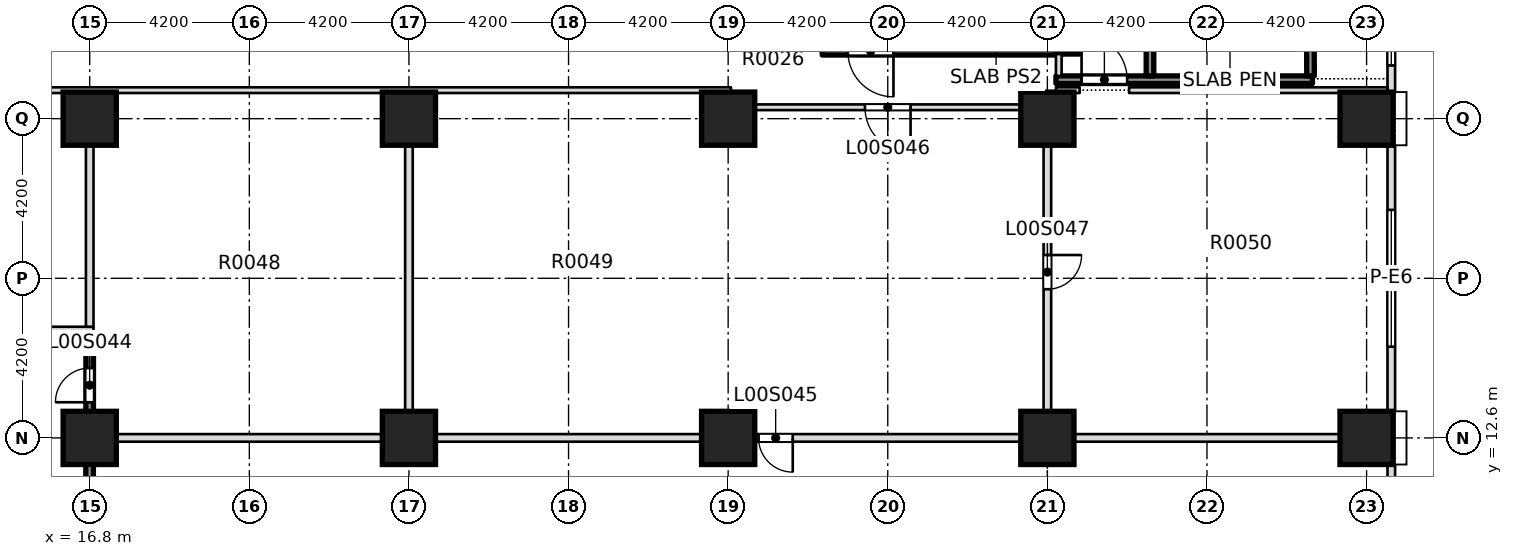
"""IFC4 building model, lengths in metres.
Left out: names, types, materials, properties, quantities, classifications, styles, units other than length and angle.
Written with IfcOpenShell. Run it as: python <this file> out.ifc"""

import sys

from ifc_helpers import new_model, si_unit, direction, frame, frame_2d, origin, origin_2d, place, context, subcontext, project, spatial, rectangle, extrude, element, fill, save


model = new_model("IFC4")
c1 = context("Model", 3, precision=1e-05, world=origin(), true_north=direction((0.0, 1.0)))
c2 = subcontext(c1, "Body", "Model", "MODEL_VIEW")
j1 = project(units=[si_unit("LENGTHUNIT", "METRE"), si_unit("PLANEANGLEUNIT", "RADIAN")], contexts=[c1])
p1 = place(None, origin())
s1 = spatial("IfcSite", under=j1, at=p1, CompositionType="ELEMENT")
p2 = place(p1, origin())
s2 = spatial("IfcBuilding", under=s1, at=p2, CompositionType="ELEMENT")
p3 = place(p2, origin())
s3 = spatial("IfcBuildingStorey", under=s2, at=p3, CompositionType="ELEMENT", Elevation=0.0)
for number, where, z_axis, x_axis in (
    (1, (16.8, 12.6, -0.45), (0.0, 0.0, 1.0), (1.0, 0.0, 0.0)),
    (2, (25.2, 12.6, -0.45), (0.0, 0.0, 1.0), (1.0, 0.0, 0.0)),
    (3, (16.8, 21.0, -0.45), (0.0, 0.0, 1.0), (1.0, 0.0, 0.0)),
):
    element("IfcColumn", number, at=place(p3, frame(where, z_axis=z_axis, x_axis=x_axis)), inside=s3, PredefinedType="COLUMN", context=c2, shape_type="SweptSolid", body=[
        extrude(rectangle(XDim=1.4, YDim=1.4, at=origin_2d()), origin(), (0.0, 0.0, 1.0), 7.55),
    ])
for number, where, z_axis, x_axis in (
    (4, (33.6, 12.6, 0.0), (0.0, 0.0, 1.0), (1.0, 0.0, 0.0)),
    (5, (42.0, 12.6, 0.0), (0.0, 0.0, 1.0), (1.0, 0.0, 0.0)),
    (6, (50.4, 12.6, 0.0), (0.0, 0.0, 1.0), (1.0, 0.0, 0.0)),
    (7, (25.2, 21.0, 0.0), (0.0, 0.0, 1.0), (1.0, 0.0, 0.0)),
    (8, (33.6, 21.0, 0.0), (0.0, 0.0, 1.0), (1.0, 0.0, 0.0)),
    (9, (42.0, 21.0, 0.0), (0.0, 0.0, 1.0), (1.0, 0.0, 0.0)),
    (10, (50.4, 21.0, 0.0), (0.0, 0.0, 1.0), (1.0, 0.0, 0.0)),
):
    element("IfcColumn", number, at=place(p3, frame(where, z_axis=z_axis, x_axis=x_axis)), inside=s3, PredefinedType="COLUMN", context=c2, shape_type="SweptSolid", body=[
        extrude(rectangle(XDim=1.4, YDim=1.4, at=origin_2d()), origin(), (0.0, 0.0, 1.0), 7.5),
    ])
p4 = place(p3, frame((16.875, 12.6, 0.0), z_axis=(0.0, 0.0, 1.0), x_axis=(1.0, 0.0, 0.0)))
e11 = element("IfcWall", 11, at=p4, inside=s3, PredefinedType="PARTITIONING", context=c2, shape_type="SweptSolid", body=[
    extrude(rectangle(XDim=34.075, YDim=0.2, at=frame_2d((17.038, 0.0))), origin(), (0.0, 0.0, 1.0), 7.1),
])
p5 = place(p4, frame((17.525, 0.0, 0.0)))
e12 = element("IfcOpeningElement", 12, at=p5, cuts=e11, PredefinedType="OPENING", context=c2, shape_type="SweptSolid", body=[
    extrude(rectangle(XDim=0.9, YDim=2.1, at=frame_2d((0.45, 1.05))), frame((0.0, 0.11, 0.0), z_axis=(0.0, -1.0, 0.0), x_axis=(1.0, 0.0, 0.0)), (0.0, 0.0, 1.0), 0.22),
])
p6 = place(p3, frame((12.601, 15.45, 0.0), z_axis=(0.0, 0.0, 1.0), x_axis=(1.0, 0.0, 0.0)))
e13 = element("IfcWall", 13, at=p6, inside=s3, PredefinedType="PARTITIONING", context=c2, shape_type="SweptSolid", body=[
    extrude(rectangle(XDim=4.299, YDim=0.15, at=frame_2d((2.149, 0.0))), origin(), (0.0, 0.0, 1.0), 7.1),
])
p7 = place(p6, frame((1.549, 0.0, 0.0)))
e14 = element("IfcOpeningElement", 14, at=p7, cuts=e13, PredefinedType="OPENING", context=c2, shape_type="SweptSolid", body=[
    extrude(rectangle(XDim=1.1, YDim=2.1, at=frame_2d((0.55, 1.05))), frame((0.0, 0.085, 0.0), z_axis=(0.0, -1.0, 0.0), x_axis=(1.0, 0.0, 0.0)), (0.0, 0.0, 1.0), 0.17),
])
p8 = place(p3, frame((33.525, 21.3, 0.0), z_axis=(0.0, 0.0, 1.0), x_axis=(1.0, 0.0, 0.0)))
e15 = element("IfcWall", 15, at=p8, inside=s3, PredefinedType="PARTITIONING", context=c2, shape_type="SweptSolid", body=[
    extrude(rectangle(XDim=8.85, YDim=0.15, at=frame_2d((4.425, 0.0))), origin(), (0.0, 0.0, 1.0), 7.1),
])
p9 = place(p8, frame((3.675, 0.0, 0.0)))
e16 = element("IfcOpeningElement", 16, at=p9, cuts=e15, PredefinedType="OPENING", context=c2, shape_type="SweptSolid", body=[
    extrude(rectangle(XDim=1.2, YDim=2.1, at=frame_2d((0.6, 1.05))), frame((0.0, 0.085, 0.0), z_axis=(0.0, -1.0, 0.0), x_axis=(1.0, 0.0, 0.0)), (0.0, 0.0, 1.0), 0.17),
])
p10 = place(p3, frame((12.601, 21.75, 0.0), z_axis=(0.0, 0.0, 1.0), x_axis=(1.0, 0.0, 0.0)))
e17 = element("IfcWall", 17, at=p10, inside=s3, PredefinedType="PARTITIONING", context=c2, shape_type="SweptSolid", body=[
    extrude(rectangle(XDim=21.074, YDim=0.15, at=frame_2d((10.537, 0.0))), origin(), (0.0, 0.0, 1.0), 7.1),
])
p11 = place(p3, frame((42.225, 21.75, 0.0), z_axis=(0.0, 0.0, 1.0), x_axis=(1.0, 0.0, 0.0)))
e18 = element("IfcWall", 18, at=p11, inside=s3, PredefinedType="PARTITIONING", context=c2, shape_type="SweptSolid", body=[
    extrude(rectangle(XDim=0.625, YDim=0.15, at=frame_2d((0.312, 0.0))), origin(), (0.0, 0.0, 1.0), 7.1),
])
p12 = place(p3, frame((42.225, 22.025, 0.0), z_axis=(0.0, 0.0, 1.0), x_axis=(1.0, 0.0, 0.0)))
e19 = element("IfcWall", 19, at=p12, inside=s3, PredefinedType="SOLIDWALL", context=c2, shape_type="SweptSolid", body=[
    extrude(rectangle(XDim=6.75, YDim=0.2, at=frame_2d((3.375, 0.0))), origin(), (0.0, 0.0, 1.0), 7.1),
])
p13 = place(p12, frame((0.675, 0.0, 0.0)))
e20 = element("IfcOpeningElement", 20, at=p13, cuts=e19, PredefinedType="OPENING", context=c2, shape_type="SweptSolid", body=[
    extrude(rectangle(XDim=1.2, YDim=2.1, at=frame_2d((0.6, 1.05))), frame((0.0, 0.11, 0.0), z_axis=(0.0, -1.0, 0.0), x_axis=(1.0, 0.0, 0.0)), (0.0, 0.0, 1.0), 0.22),
])
p14 = place(p3, frame((36.075, 22.775, 0.0), z_axis=(0.0, 0.0, 1.0), x_axis=(1.0, 0.0, 0.0)))
e21 = element("IfcWall", 21, at=p14, inside=s3, PredefinedType="SOLIDWALL", context=c2, shape_type="SweptSolid", body=[
    extrude(rectangle(XDim=6.3, YDim=0.2, at=frame_2d((3.15, 0.0))), origin(), (0.0, 0.0, 1.0), 7.1),
])
p15 = place(p14, frame((0.675, 0.0, 0.0)))
e22 = element("IfcOpeningElement", 22, at=p15, cuts=e21, PredefinedType="OPENING", context=c2, shape_type="SweptSolid", body=[
    extrude(rectangle(XDim=1.2, YDim=2.1, at=frame_2d((0.6, 1.05))), frame((0.0, 0.11, 0.0), z_axis=(0.0, -1.0, 0.0), x_axis=(1.0, 0.0, 0.0)), (0.0, 0.0, 1.0), 0.22),
])
p16 = place(p3, frame((42.225, 22.8, 0.0), z_axis=(0.0, 0.0, 1.0), x_axis=(1.0, 0.0, 0.0)))
e23 = element("IfcWall", 23, at=p16, inside=s3, PredefinedType="SOLIDWALL", context=c2, shape_type="SweptSolid", body=[
    extrude(rectangle(XDim=0.625, YDim=0.2, at=frame_2d((0.312, 0.0))), origin(), (0.0, 0.0, 1.0), 7.1),
])
p17 = place(p3, frame((16.775, -12.525, 0.0), z_axis=(0.0, 0.0, 1.0), x_axis=(0.000893357267, 0.999999600956, 0.0)))
e24 = element("IfcWall", 24, at=p17, inside=s3, PredefinedType="SOLIDWALL", context=c2, shape_type="SweptSolid", body=[
    extrude(rectangle(XDim=27.875, YDim=0.2, at=frame_2d((13.938, 0.0))), origin(), (0.0, 0.0, 1.0), 7.1),
])
p18 = place(p17, frame((16.225, 0.0, 0.0)))
e25 = element("IfcOpeningElement", 25, at=p18, cuts=e24, PredefinedType="OPENING", context=c2, shape_type="SweptSolid", body=[
    extrude(rectangle(XDim=1.5, YDim=2.1, at=frame_2d((0.75, 1.05))), frame((0.0, 0.11, 0.0), z_axis=(0.0, -1.0, 0.0), x_axis=(1.0, 0.0, 0.0)), (0.0, 0.0, 1.0), 0.22),
])
p19 = place(p17, frame((26.062, 0.0, 0.0)))
e26 = element("IfcOpeningElement", 26, at=p19, cuts=e24, PredefinedType="OPENING", context=c2, shape_type="SweptSolid", body=[
    extrude(rectangle(XDim=0.9, YDim=2.1, at=frame_2d((0.45, 1.05))), frame((0.0, 0.11, 0.0), z_axis=(0.0, -1.0, 0.0), x_axis=(1.0, 0.0, 0.0)), (0.0, 0.0, 1.0), 0.22),
])
p20 = place(p3, frame((16.8, 15.525, 0.0), z_axis=(0.0, 0.0, 1.0), x_axis=(0.0, 1.0, 0.0)))
e27 = element("IfcWall", 27, at=p20, inside=s3, PredefinedType="PARTITIONING", context=c2, shape_type="SweptSolid", body=[
    extrude(rectangle(XDim=6.15, YDim=0.2, at=frame_2d((3.075, 0.0))), origin(), (0.0, 0.0, 1.0), 7.1),
])
p21 = place(p3, frame((25.2, 12.7, 0.0), z_axis=(0.0, 0.0, 1.0), x_axis=(0.0, 1.0, 0.0)))
e28 = element("IfcWall", 28, at=p21, inside=s3, PredefinedType="PARTITIONING", context=c2, shape_type="SweptSolid", body=[
    extrude(rectangle(XDim=8.975, YDim=0.2, at=frame_2d((4.488, 0.0))), origin(), (0.0, 0.0, 1.0), 7.1),
])
p22 = place(p3, frame((33.6, 21.375, 0.0), z_axis=(0.0, 0.0, 1.0), x_axis=(0.0, 1.0, 0.0)))
e29 = element("IfcWall", 29, at=p22, inside=s3, PredefinedType="PARTITIONING", context=c2, shape_type="SweptSolid", body=[
    extrude(rectangle(XDim=0.3, YDim=0.15, at=frame_2d((0.15, 0.0))), origin(), (0.0, 0.0, 1.0), 7.1),
])
p23 = place(p3, frame((42.0, 12.7, 0.0), z_axis=(0.0, 0.0, 1.0), x_axis=(0.0, 1.0, 0.0)))
e30 = element("IfcWall", 30, at=p23, inside=s3, PredefinedType="PARTITIONING", context=c2, shape_type="SweptSolid", body=[
    extrude(rectangle(XDim=8.525, YDim=0.2, at=frame_2d((4.263, 0.0))), origin(), (0.0, 0.0, 1.0), 7.1),
])
p24 = place(p23, frame((3.812, 0.0, 0.0)))
e31 = element("IfcOpeningElement", 31, at=p24, cuts=e30, PredefinedType="OPENING", context=c2, shape_type="SweptSolid", body=[
    extrude(rectangle(XDim=0.9, YDim=2.1, at=frame_2d((0.45, 1.05))), frame((0.0, 0.11, 0.0), z_axis=(0.0, -1.0, 0.0), x_axis=(1.0, 0.0, 0.0)), (0.0, 0.0, 1.0), 0.22),
])
p25 = place(p3, frame((42.3, 21.375, 0.0), z_axis=(0.0, 0.0, 1.0), x_axis=(0.0, 1.0, 0.0)))
e32 = element("IfcWall", 32, at=p25, inside=s3, PredefinedType="PARTITIONING", context=c2, shape_type="SweptSolid", body=[
    extrude(rectangle(XDim=0.3, YDim=0.15, at=frame_2d((0.15, 0.0))), origin(), (0.0, 0.0, 1.0), 7.1),
])
p26 = place(p3, frame((42.3, 22.125, 0.0), z_axis=(0.0, 0.0, 1.0), x_axis=(0.0, 1.0, 0.0)))
e33 = element("IfcWall", 33, at=p26, inside=s3, PredefinedType="PARTITIONING", context=c2, shape_type="SweptSolid", body=[
    extrude(rectangle(XDim=0.575, YDim=0.15, at=frame_2d((0.288, 0.0))), origin(), (0.0, 0.0, 1.0), 7.1),
])
p27 = place(p3, frame((44.7, 22.125, 0.0), z_axis=(0.0, 0.0, 1.0), x_axis=(0.0, 1.0, 0.0)))
e34 = element("IfcWall", 34, at=p27, inside=s3, PredefinedType="SOLIDWALL", context=c2, shape_type="SweptSolid", body=[
    extrude(rectangle(XDim=6.125, YDim=0.2, at=frame_2d((3.062, 0.0))), origin(), (0.0, 0.0, 1.0), 7.1),
])
p28 = place(p27, frame((4.725, 0.0, 0.0)))
e35 = element("IfcOpeningElement", 35, at=p28, cuts=e34, PredefinedType="OPENING", context=c2, shape_type="SweptSolid", body=[
    extrude(rectangle(XDim=1.2, YDim=2.1, at=frame_2d((0.6, 1.05))), frame((0.0, 0.11, 0.0), z_axis=(0.0, -1.0, 0.0), x_axis=(1.0, 0.0, 0.0)), (0.0, 0.0, 1.0), 0.22),
])
p29 = place(p3, frame((48.925, 22.125, 0.0), z_axis=(0.0, 0.0, 1.0), x_axis=(-0.003935829573, 0.999992254593, 0.0)))
e36 = element("IfcWall", 36, at=p29, inside=s3, PredefinedType="SOLIDWALL", context=c2, shape_type="SweptSolid", body=[
    extrude(rectangle(XDim=1.675, YDim=0.2, at=frame_2d((0.837, 0.0))), origin(), (0.0, 0.0, 1.0), 7.1),
])
p30 = place(p3, frame((51.05, 11.9, 0.0), z_axis=(0.0, 0.0, 1.0), x_axis=(0.0, -1.0, 0.0)))
e37 = element("IfcWall", 37, at=p30, inside=s3, PredefinedType="STANDARD", context=c2, shape_type="SweptSolid", body=[
    extrude(rectangle(XDim=7.0, YDim=0.2, at=frame_2d((3.5, 0.0))), origin(), (0.0, 0.0, 1.0), 7.1),
])
p31 = place(p30, frame((4.5, 0.0, 0.3)))
e38 = element("IfcOpeningElement", 38, at=p31, cuts=e37, PredefinedType="OPENING", context=c2, shape_type="SweptSolid", body=[
    extrude(rectangle(XDim=1.8, YDim=4.2, at=frame_2d((0.9, 2.1))), frame((0.0, 0.11, 0.0), z_axis=(0.0, -1.0, 0.0), x_axis=(1.0, 0.0, 0.0)), (0.0, 0.0, 1.0), 0.22),
])
p32 = place(p30, frame((2.6, 0.0, 0.0)))
e39 = element("IfcOpeningElement", 39, at=p32, cuts=e37, PredefinedType="OPENING", context=c2, shape_type="SweptSolid", body=[
    extrude(rectangle(XDim=1.8, YDim=2.4, at=frame_2d((0.9, 1.2))), frame((0.0, 0.11, 0.0), z_axis=(0.0, -1.0, 0.0), x_axis=(1.0, 0.0, 0.0)), (0.0, 0.0, 1.0), 0.22),
])
p33 = place(p30, frame((0.7, 0.0, 0.3)))
e40 = element("IfcOpeningElement", 40, at=p33, cuts=e37, PredefinedType="OPENING", context=c2, shape_type="SweptSolid", body=[
    extrude(rectangle(XDim=1.8, YDim=4.2, at=frame_2d((0.9, 2.1))), frame((0.0, 0.11, 0.0), z_axis=(0.0, -1.0, 0.0), x_axis=(1.0, 0.0, 0.0)), (0.0, 0.0, 1.0), 0.22),
])
p34 = place(p3, frame((51.05, 13.3, 0.0), z_axis=(0.0, 0.0, 1.0), x_axis=(0.0, 1.0, 0.0)))
e41 = element("IfcWall", 41, at=p34, inside=s3, PredefinedType="STANDARD", context=c2, shape_type="SweptSolid", body=[
    extrude(rectangle(XDim=7.0, YDim=0.2, at=frame_2d((3.5, 0.0))), origin(), (0.0, 0.0, 1.0), 7.1),
])
p35 = place(p34, frame((1.7, 0.0, 0.3)))
e42 = element("IfcOpeningElement", 42, at=p35, cuts=e41, PredefinedType="OPENING", context=c2, shape_type="SweptSolid", body=[
    extrude(rectangle(XDim=3.6, YDim=4.2, at=frame_2d((1.8, 2.1))), frame((0.0, 0.11, 0.0), z_axis=(0.0, -1.0, 0.0), x_axis=(1.0, 0.0, 0.0)), (0.0, 0.0, 1.0), 0.22),
])
p36 = place(p3, frame((51.05, 28.7, 0.0), z_axis=(0.0, 0.0, 1.0), x_axis=(0.0, -1.0, 0.0)))
e43 = element("IfcWall", 43, at=p36, inside=s3, PredefinedType="STANDARD", context=c2, shape_type="SweptSolid", body=[
    extrude(rectangle(XDim=7.0, YDim=0.2, at=frame_2d((3.5, 0.0))), origin(), (0.0, 0.0, 1.0), 7.1),
])
p37 = place(p36, frame((4.5, 0.0, 0.3)))
e44 = element("IfcOpeningElement", 44, at=p37, cuts=e43, PredefinedType="OPENING", context=c2, shape_type="SweptSolid", body=[
    extrude(rectangle(XDim=1.8, YDim=4.2, at=frame_2d((0.9, 2.1))), frame((0.0, 0.11, 0.0), z_axis=(0.0, -1.0, 0.0), x_axis=(1.0, 0.0, 0.0)), (0.0, 0.0, 1.0), 0.22),
])
p38 = place(p36, frame((2.6, 0.0, 0.0)))
e45 = element("IfcOpeningElement", 45, at=p38, cuts=e43, PredefinedType="OPENING", context=c2, shape_type="SweptSolid", body=[
    extrude(rectangle(XDim=1.8, YDim=2.4, at=frame_2d((0.9, 1.2))), frame((0.0, 0.11, 0.0), z_axis=(0.0, -1.0, 0.0), x_axis=(1.0, 0.0, 0.0)), (0.0, 0.0, 1.0), 0.22),
])
p39 = place(p36, frame((0.7, 0.0, 0.3)))
e46 = element("IfcOpeningElement", 46, at=p39, cuts=e43, PredefinedType="OPENING", context=c2, shape_type="SweptSolid", body=[
    extrude(rectangle(XDim=1.8, YDim=4.2, at=frame_2d((0.9, 2.1))), frame((0.0, 0.11, 0.0), z_axis=(0.0, -1.0, 0.0), x_axis=(1.0, 0.0, 0.0)), (0.0, 0.0, 1.0), 0.22),
])
p40 = place(p3, frame((44.15, 21.75, 0.0), z_axis=(0.0, 0.0, 1.0), x_axis=(1.0, 0.0, 0.0)))
e47 = element("IfcWall", 47, at=p40, inside=s3, PredefinedType="PARTITIONING", context=c2, shape_type="SweptSolid", body=[
    extrude(rectangle(XDim=6.8, YDim=0.15, at=frame_2d((3.4, 0.0))), origin(), (0.0, 0.0, 1.0), 7.1),
])
p41 = place(p13, origin())
e48 = element("IfcDoor", 48, at=p41, inside=s3, OperationType="SINGLE_SWING_LEFT", PredefinedType="DOOR", context=c2, shape_type="SweptSolid", body=[
    extrude(rectangle(XDim=1.2, YDim=2.1, at=frame_2d((0.6, 1.05))), frame((0.0, 0.025, 0.0), z_axis=(0.0, -1.0, 0.0), x_axis=(1.0, 0.0, 0.0)), (0.0, 0.0, 1.0), 0.05),
])
fill(e20, e48)
p42 = place(p19, origin())
e49 = element("IfcDoor", 49, at=p42, inside=s3, OperationType="SINGLE_SWING_LEFT", PredefinedType="DOOR", context=c2, shape_type="SweptSolid", body=[
    extrude(rectangle(XDim=0.9, YDim=2.1, at=frame_2d((0.45, 1.05))), frame((0.0, 0.025, 0.0), z_axis=(0.0, -1.0, 0.0), x_axis=(1.0, 0.0, 0.0)), (0.0, 0.0, 1.0), 0.05),
])
fill(e26, e49)
p43 = place(p5, origin())
e50 = element("IfcDoor", 50, at=p43, inside=s3, OperationType="SINGLE_SWING_RIGHT", PredefinedType="DOOR", context=c2, shape_type="SweptSolid", body=[
    extrude(rectangle(XDim=0.9, YDim=2.1, at=frame_2d((0.45, 1.05))), frame((0.0, 0.025, 0.0), z_axis=(0.0, -1.0, 0.0), x_axis=(1.0, 0.0, 0.0)), (0.0, 0.0, 1.0), 0.05),
])
fill(e12, e50)
p44 = place(p9, origin())
e51 = element("IfcDoor", 51, at=p44, inside=s3, OperationType="SINGLE_SWING_RIGHT", PredefinedType="DOOR", context=c2, shape_type="SweptSolid", body=[
    extrude(rectangle(XDim=1.2, YDim=2.1, at=frame_2d((0.6, 1.05))), frame((0.0, 0.025, 0.0), z_axis=(0.0, -1.0, 0.0), x_axis=(1.0, 0.0, 0.0)), (0.0, 0.0, 1.0), 0.05),
])
fill(e16, e51)
p45 = place(p24, origin())
e52 = element("IfcDoor", 52, at=p45, inside=s3, OperationType="SINGLE_SWING_RIGHT", PredefinedType="DOOR", context=c2, shape_type="SweptSolid", body=[
    extrude(rectangle(XDim=0.9, YDim=2.1, at=frame_2d((0.45, 1.05))), frame((0.0, 0.025, 0.0), z_axis=(0.0, -1.0, 0.0), x_axis=(1.0, 0.0, 0.0)), (0.0, 0.0, 1.0), 0.05),
])
fill(e31, e52)
p46 = place(p35, origin())
e53 = element("IfcWindow", 53, at=p46, inside=s3, PartitioningType="SINGLE_PANEL", PredefinedType="WINDOW", context=c2, shape_type="SweptSolid", body=[
    extrude(rectangle(XDim=3.6, YDim=4.2, at=frame_2d((1.8, 2.1))), frame((0.0, 0.03, 0.0), z_axis=(0.0, -1.0, 0.0), x_axis=(1.0, 0.0, 0.0)), (0.0, 0.0, 1.0), 0.06),
])
fill(e42, e53)
p47 = place(p37, origin())
e54 = element("IfcWindow", 54, at=p47, inside=s3, PartitioningType="SINGLE_PANEL", PredefinedType="WINDOW", context=c2, shape_type="SweptSolid", body=[
    extrude(rectangle(XDim=1.8, YDim=4.2, at=frame_2d((0.9, 2.1))), frame((0.0, 0.03, 0.0), z_axis=(0.0, -1.0, 0.0), x_axis=(1.0, 0.0, 0.0)), (0.0, 0.0, 1.0), 0.06),
])
fill(e44, e54)
save(model, sys.argv[1])
